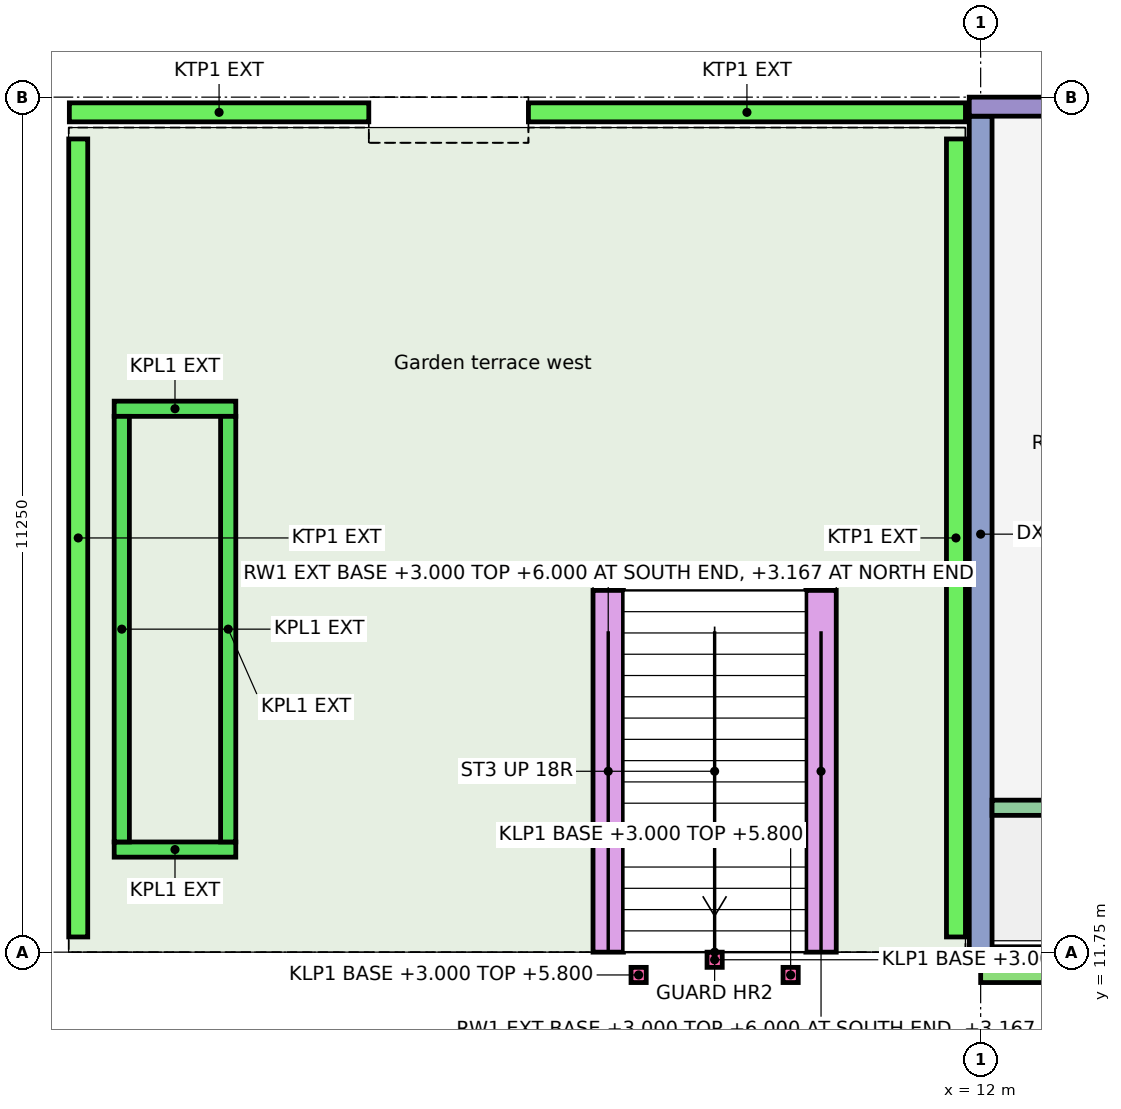
"""IFC4 building model, lengths in metres.
Left out: names, types, materials, properties, quantities, classifications, styles, units other than length and angle.
Written with IfcOpenShell. Run it as: python <this file> out.ifc"""

import sys

from ifc_helpers import new_model, si_unit, direction, frame, frame_2d, origin, origin_2d, place, context, subcontext, project, spatial, polyline, rectangle, outline, extrude, element, save


model = new_model("IFC4")
c1 = context("Model", 3, precision=1e-05, world=origin(), true_north=direction((0.0, 1.0)))
c2 = subcontext(c1, "Body", "Model", "MODEL_VIEW")
j1 = project(units=[si_unit("LENGTHUNIT", "METRE"), si_unit("PLANEANGLEUNIT", "RADIAN")], contexts=[c1])
p1 = place(None, origin())
s1 = spatial("IfcSite", under=j1, at=p1, CompositionType="ELEMENT")
p2 = place(p1, origin())
s2 = spatial("IfcBuilding", under=s1, at=p2, CompositionType="ELEMENT")
p3 = place(p2, frame((0.0, 0.0, 3.0)))
s3 = spatial("IfcBuildingStorey", under=s2, at=p3, CompositionType="ELEMENT", Elevation=3.0)
p4 = place(p3, frame((12.0, 11.75, 0.0), z_axis=(0.0, 0.0, 1.0), x_axis=(0.0, 1.0, 0.0)))
e1 = element("IfcWall", 1, at=p4, inside=s3, PredefinedType="SHEAR", context=c2, shape_type="SweptSolid", body=[
    extrude(rectangle(XDim=11.0, YDim=0.3, at=frame_2d((5.5, 0.0))), origin(), (0.0, 0.0, 1.0), 3.0),
])
p5 = place(p3, frame((11.85, 22.875, 0.0), z_axis=(0.0, 0.0, 1.0), x_axis=(1.0, 0.0, 0.0)))
e2 = element("IfcWall", 2, at=p5, inside=s3, PredefinedType="SOLIDWALL", context=c2, shape_type="SweptSolid", body=[
    extrude(rectangle(XDim=3.75, YDim=0.25, at=frame_2d((1.875, 0.0))), origin(), (0.0, 0.0, 1.0), 3.0),
])
p6 = place(p3, frame((12.15, 13.65, 0.0), z_axis=(0.0, 0.0, 1.0), x_axis=(1.0, 0.0, 0.0)))
e3 = element("IfcWall", 3, at=p6, inside=s3, PredefinedType="SOLIDWALL", context=c2, shape_type="SweptSolid", body=[
    extrude(rectangle(XDim=3.45, YDim=0.2, at=frame_2d((1.725, 0.0))), origin(), (0.0, 0.0, 1.0), 3.0),
])
p7 = place(p6, frame((1.163, 0.0, 0.0)))
e4 = element("IfcOpeningElement", 4, at=p7, cuts=e3, PredefinedType="OPENING", context=c2, shape_type="SweptSolid", body=[
    extrude(rectangle(XDim=1.0, YDim=2.1, at=frame_2d((0.5, 1.05))), frame((0.0, 0.11, 0.0), z_axis=(0.0, -1.0, 0.0), x_axis=(1.0, 0.0, 0.0)), (0.0, 0.0, 1.0), 0.22),
])
p8 = place(p3, frame((12.0, 11.55, 0.0), z_axis=(0.0, 0.0, 1.0), x_axis=(1.0, 0.0, 0.0)))
e5 = element("IfcWall", 5, at=p8, inside=s3, PredefinedType="SOLIDWALL", context=c2, shape_type="SweptSolid", body=[
    extrude(rectangle(XDim=16.8, YDim=0.4, at=frame_2d((8.4, 0.0))), origin(), (0.0, 0.0, 1.0), 2.85),
])
p9 = place(p3, frame((0.01, 22.8, 0.0), z_axis=(0.0, 0.0, 1.0), x_axis=(1.0, 0.0, 0.0)))
e6 = element("IfcWall", 6, at=p9, inside=s3, PredefinedType="PARAPET", context=c2, shape_type="SweptSolid", body=[
    extrude(rectangle(XDim=3.94, YDim=0.25, at=frame_2d((1.97, 0.0))), origin(), (0.0, 0.0, 1.0), 1.1),
])
p10 = place(p3, frame((6.05, 22.8, 0.0), z_axis=(0.0, 0.0, 1.0), x_axis=(1.0, 0.0, 0.0)))
e7 = element("IfcWall", 7, at=p10, inside=s3, PredefinedType="PARAPET", context=c2, shape_type="SweptSolid", body=[
    extrude(rectangle(XDim=5.75, YDim=0.25, at=frame_2d((2.875, 0.0))), origin(), (0.0, 0.0, 1.0), 1.1),
])
p11 = place(p2, origin())
s4 = spatial("IfcBuildingStorey", under=s2, at=p11, CompositionType="ELEMENT", Elevation=0.0)
p12 = place(p11, frame((0.01, 11.55, -0.25), z_axis=(0.0, 0.0, 1.0), x_axis=(1.0, 0.0, 0.0)))
e8 = element("IfcWall", 8, at=p12, inside=s4, PredefinedType="SOLIDWALL", context=c2, shape_type="SweptSolid", body=[
    extrude(rectangle(XDim=7.29, YDim=0.4, at=frame_2d((3.645, 0.0))), origin(), (0.0, 0.0, 1.0), 6.25),
])
p13 = place(p11, frame((9.7, 11.55, -0.25), z_axis=(0.0, 0.0, 1.0), x_axis=(1.0, 0.0, 0.0)))
e9 = element("IfcWall", 9, at=p13, inside=s4, PredefinedType="SOLIDWALL", context=c2, shape_type="SweptSolid", body=[
    extrude(rectangle(XDim=2.3, YDim=0.4, at=frame_2d((1.15, 0.0))), origin(), (0.0, 0.0, 1.0), 6.25),
])
for number, where, z_axis, x_axis in (
    (10, (7.5, 11.45, 0.0), (0.0, 0.0, 1.0), (1.0, 0.0, 0.0)),
    (11, (9.5, 11.45, 0.0), (0.0, 0.0, 1.0), (1.0, 0.0, 0.0)),
    (12, (8.5, 11.65, 0.0), (0.0, 0.0, 1.0), (1.0, 0.0, 0.0)),
):
    element("IfcColumn", number, at=place(p3, frame(where, z_axis=z_axis, x_axis=x_axis)), inside=s3, PredefinedType="COLUMN", context=c2, shape_type="SweptSolid", body=[
        extrude(rectangle(XDim=0.2, YDim=0.2, at=origin_2d()), origin(), (0.0, 0.0, 1.0), 2.8),
    ])
for number, where, z_axis, x_axis in (
    (13, (0.127, 11.95, 0.0), (0.0, 0.0, 1.0), (0.0, 1.0, 0.0)),
    (14, (11.675, 11.95, 0.0), (0.0, 0.0, 1.0), (0.0, 1.0, 0.0)),
):
    element("IfcWall", number, at=place(p3, frame(where, z_axis=z_axis, x_axis=x_axis)), inside=s3, PredefinedType="PARAPET", context=c2, shape_type="SweptSolid", body=[
        extrude(rectangle(XDim=10.5, YDim=0.25, at=frame_2d((5.25, 0.0))), origin(), (0.0, 0.0, 1.0), 1.1),
    ])
for number, where, z_axis, x_axis in (
    (15, (0.6, 13.1, 0.0), (0.0, 0.0, 1.0), (1.0, 0.0, 0.0)),
    (16, (0.6, 18.9, 0.0), (0.0, 0.0, 1.0), (1.0, 0.0, 0.0)),
):
    element("IfcWall", number, at=place(p3, frame(where, z_axis=z_axis, x_axis=x_axis)), inside=s3, PredefinedType="SOLIDWALL", context=c2, shape_type="SweptSolid", body=[
        extrude(rectangle(XDim=1.6, YDim=0.2, at=frame_2d((0.8, 0.0))), origin(), (0.0, 0.0, 1.0), 0.6),
    ])
for number, where, z_axis, x_axis in (
    (17, (0.7, 13.2, 0.0), (0.0, 0.0, 1.0), (0.0, 1.0, 0.0)),
    (18, (2.1, 13.2, 0.0), (0.0, 0.0, 1.0), (0.0, 1.0, 0.0)),
):
    element("IfcWall", number, at=place(p3, frame(where, z_axis=z_axis, x_axis=x_axis)), inside=s3, PredefinedType="SOLIDWALL", context=c2, shape_type="SweptSolid", body=[
        extrude(rectangle(XDim=5.6, YDim=0.2, at=frame_2d((2.8, 0.0))), origin(), (0.0, 0.0, 1.0), 0.6),
    ])
p14 = place(p11, frame((0.202, 0.402, -0.25), z_axis=(0.0, 0.0, 1.0), x_axis=(0.0, 1.0, 0.0)))
e19 = element("IfcWall", 19, at=p14, inside=s4, PredefinedType="SOLIDWALL", context=c2, shape_type="SweptSolid", body=[
    extrude(rectangle(XDim=10.948, YDim=0.4, at=frame_2d((5.474, 0.0))), origin(), (0.0, 0.0, 1.0), 6.0),
])
for number, where, z_axis, x_axis in (
    (20, (7.1, 11.75, 0.0), (0.0, 0.0, 1.0), (0.0, 1.0, 0.0)),
    (21, (9.9, 11.75, 0.0), (0.0, 0.0, 1.0), (0.0, 1.0, 0.0)),
):
    element("IfcWall", number, at=place(p3, frame(where, z_axis=z_axis, x_axis=x_axis)), inside=s3, PredefinedType="SOLIDWALL", context=c2, shape_type="SweptSolid", body=[
        extrude(outline(polyline([(0.0, 0.0), (4.76, 0.0), (4.76, 0.167), (0.0, 3.0), (0.0, 0.0)])), frame((0.0, 0.2, 0.0), z_axis=(0.0, -1.0, 0.0), x_axis=(1.0, 0.0, 0.0)), (0.0, 0.0, 1.0), 0.4),
    ])
save(model, sys.argv[1])
